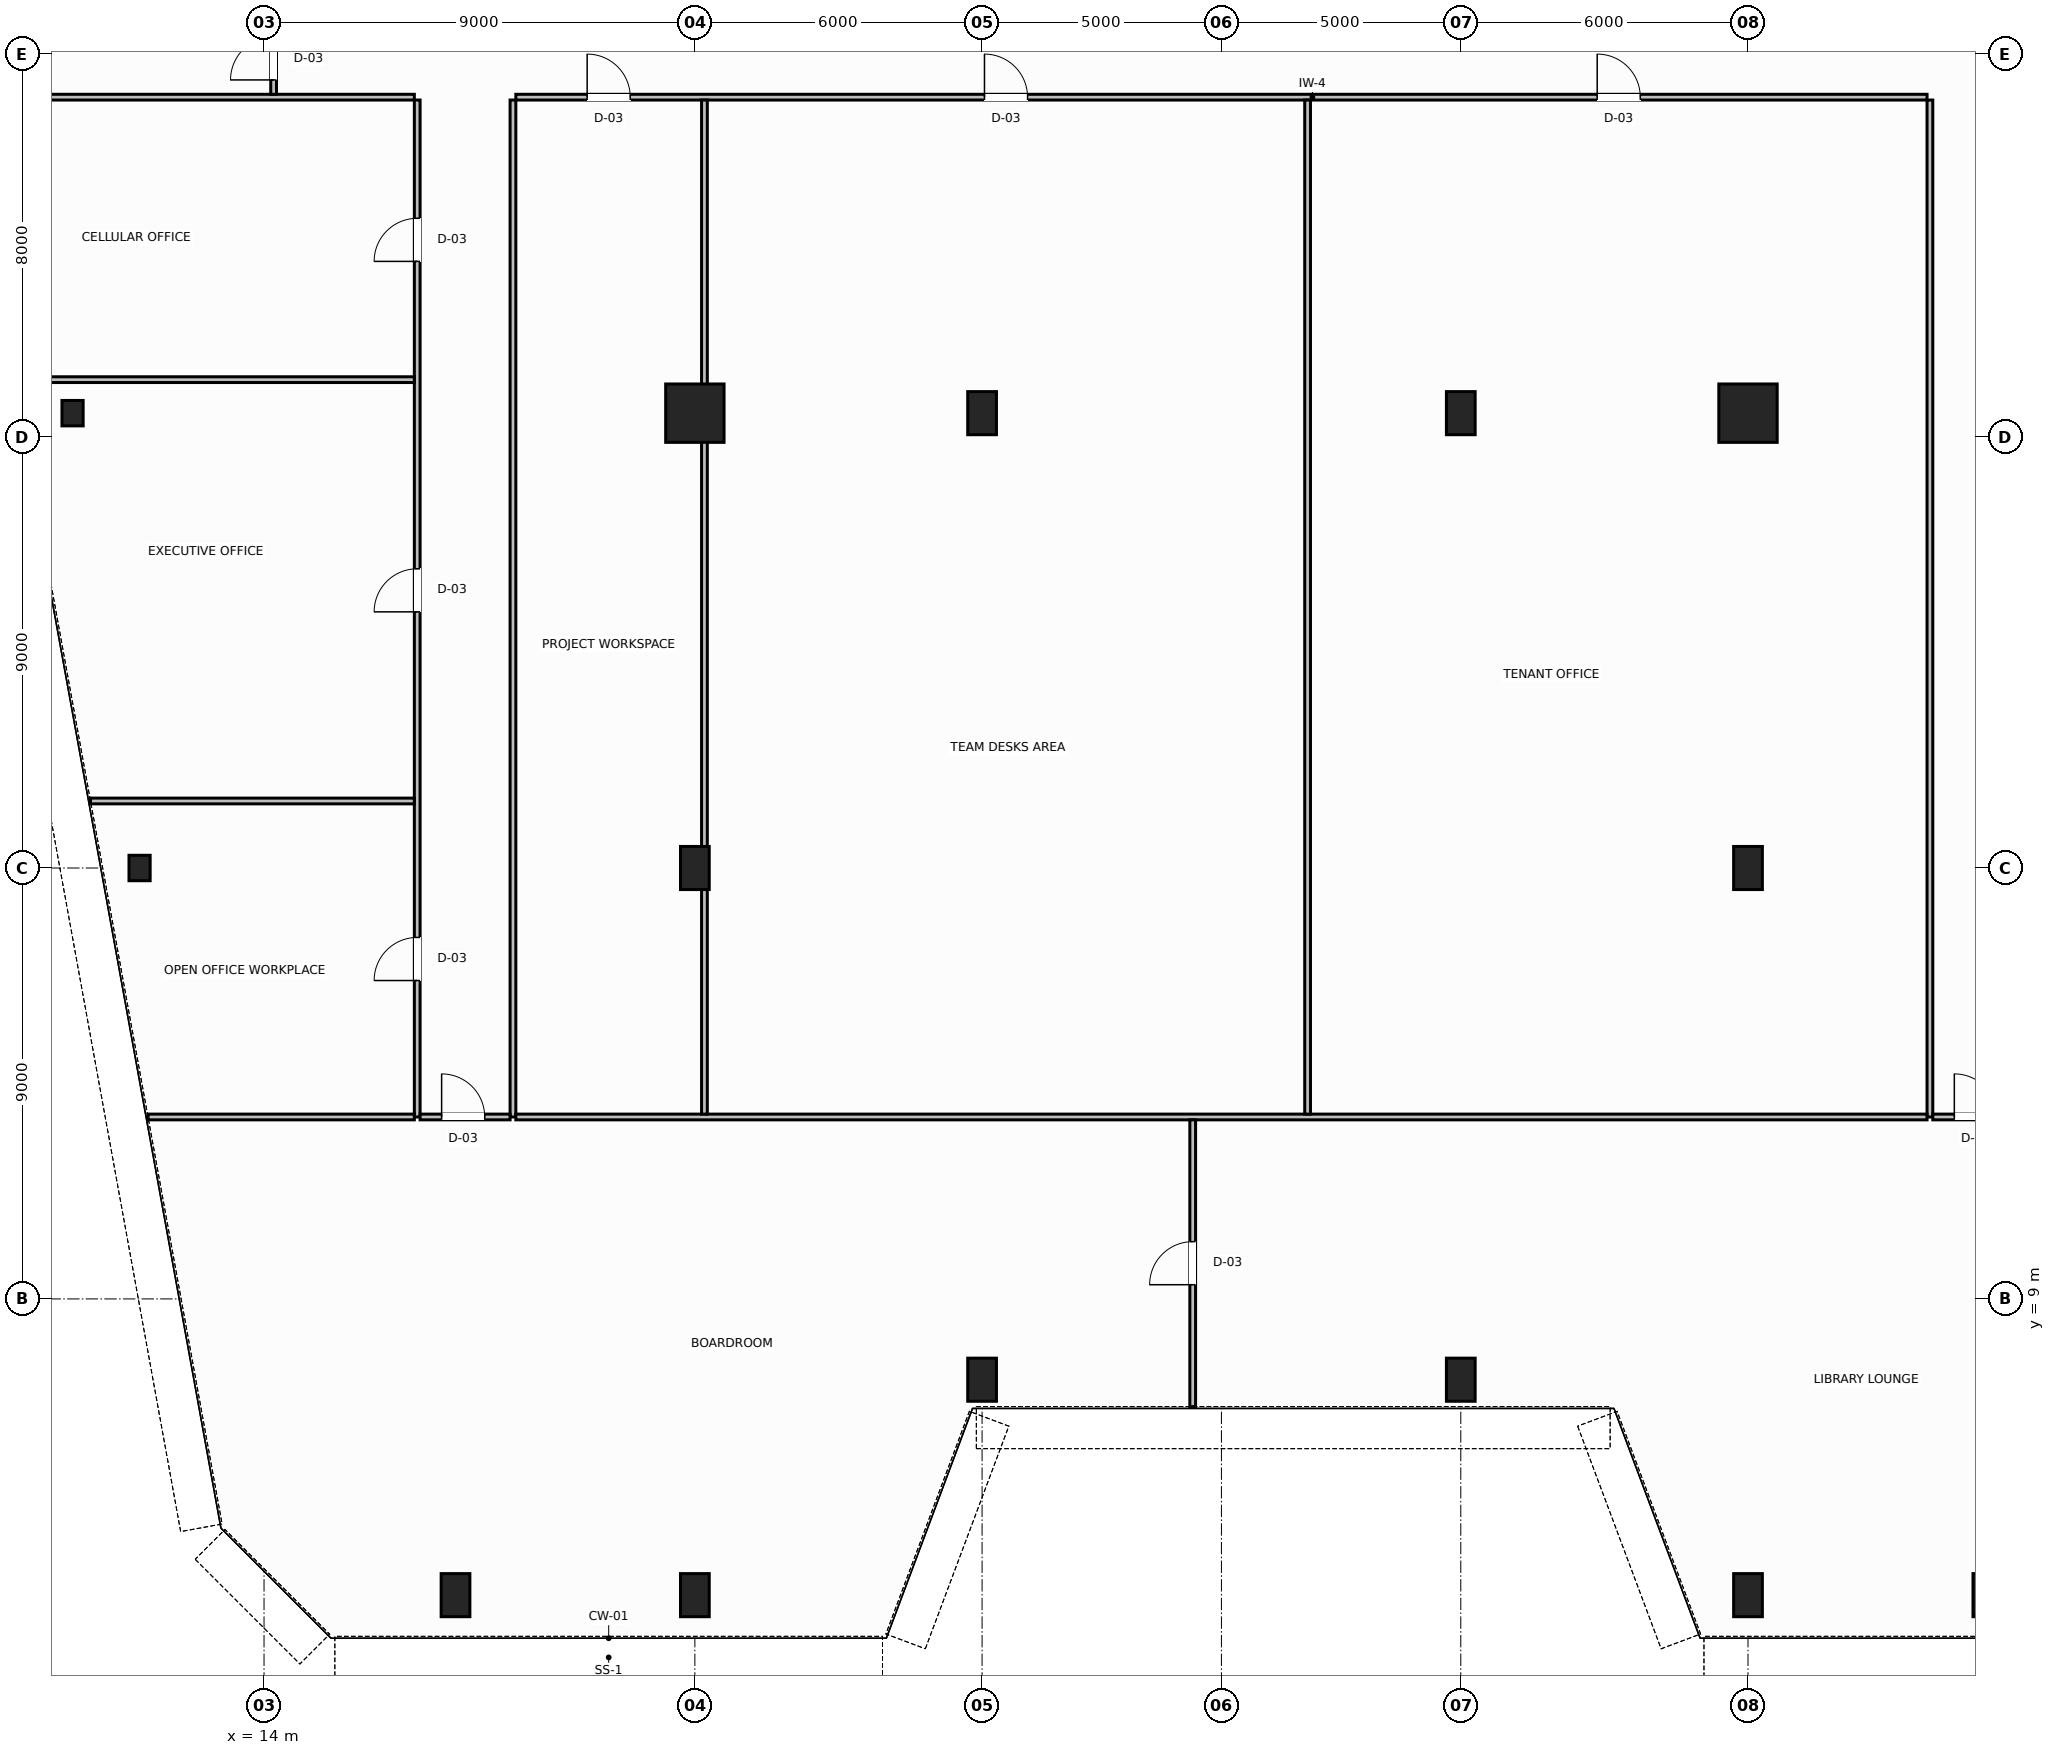
"""IFC4 building model, lengths in metres.
Left out: names, types, materials, properties, quantities, classifications, styles, units other than length and angle.
Written with IfcOpenShell. Run it as: python <this file> out.ifc"""

import sys

from ifc_helpers import new_model, si_unit, direction, frame, frame_2d, origin, origin_2d, place, context, subcontext, project, spatial, rectangle, hollow_rectangle, hollow_circle, i_section, extrude, source, transform, mapped, element, fill, save


model = new_model("IFC4")
c1 = context("Model", 3, precision=1e-05, world=origin(), true_north=direction((0.0, 1.0)))
c2 = subcontext(c1, "Body", "Model", "MODEL_VIEW")
j1 = project(units=[si_unit("LENGTHUNIT", "METRE"), si_unit("PLANEANGLEUNIT", "RADIAN")], contexts=[c1])
p1 = place(None, origin())
s1 = spatial("IfcSite", under=j1, at=p1, CompositionType="ELEMENT")
p2 = place(p1, origin())
s2 = spatial("IfcBuilding", under=s1, at=p2, CompositionType="ELEMENT")
p3 = place(p2, frame((0.0, 0.0, 49.2)))
s3 = spatial("IfcBuildingStorey", under=s2, at=p3, CompositionType="ELEMENT", Elevation=49.2)
m1 = source(origin(), c2, "Body", "SweptSolid", [
    extrude(i_section(OverallWidth=0.442, OverallDepth=0.531, WebThickness=0.065, FlangeThickness=0.076, FilletRadius=0.015, at=origin_2d()), origin(), (0.0, 0.0, 1.0), 3.8),
])
for number, where, z_axis, x_axis in (
    (1, (10.0, 27.5, 0.0), (0.0, 0.0, 1.0), (1.0, 0.0, 0.0)),
    (2, (11.4, 18.0, 0.0), (0.0, 0.0, 1.0), (1.0, 0.0, 0.0)),
):
    element("IfcColumn", number, at=place(p3, frame(where, z_axis=z_axis, x_axis=x_axis)), inside=s3, PredefinedType="COLUMN", context=c2, shape_type="MappedRepresentation", body=[
        mapped(m1, transform((0.0, 0.0, 0.0), scale=1.0)),
    ])
m2 = source(origin(), c2, "Body", "SweptSolid", [
    extrude(hollow_circle(Radius=0.61, WallThickness=0.05, at=origin_2d()), origin(), (0.0, 0.0, 1.0), 3.8),
])
p4 = place(p3, frame((23.0, 27.5, 0.0), z_axis=(0.0, 0.0, 1.0), x_axis=(1.0, 0.0, 0.0)))
e3 = element("IfcColumn", 3, at=p4, inside=s3, PredefinedType="COLUMN", context=c2, shape_type="MappedRepresentation", body=[
    mapped(m2, transform((0.0, 0.0, 0.0), scale=1.0)),
])
m3 = source(origin(), c2, "Body", "SweptSolid", [
    extrude(hollow_rectangle(XDim=0.6, YDim=0.9, WallThickness=0.04, InnerFilletRadius=0.04, OuterFilletRadius=0.08, at=origin_2d()), origin(), (0.0, 0.0, 1.0), 3.8),
])
for number, where, z_axis, x_axis in (
    (4, (29.0, 27.5, 0.0), (0.0, 0.0, 1.0), (1.0, 0.0, 0.0)),
    (5, (39.0, 27.5, 0.0), (0.0, 0.0, 1.0), (1.0, 0.0, 0.0)),
):
    element("IfcColumn", number, at=place(p3, frame(where, z_axis=z_axis, x_axis=x_axis)), inside=s3, PredefinedType="COLUMN", context=c2, shape_type="MappedRepresentation", body=[
        mapped(m3, transform((0.0, 0.0, 0.0), scale=1.0)),
    ])
p5 = place(p3, frame((45.0, 27.5, 0.0), z_axis=(0.0, 0.0, 1.0), x_axis=(1.0, 0.0, 0.0)))
e6 = element("IfcColumn", 6, at=p5, inside=s3, PredefinedType="COLUMN", context=c2, shape_type="MappedRepresentation", body=[
    mapped(m2, transform((0.0, 0.0, 0.0), scale=1.0)),
])
for number, where, z_axis, x_axis in (
    (7, (23.0, 18.0, 0.0), (0.0, 0.0, 1.0), (1.0, 0.0, 0.0)),
    (8, (45.0, 18.0, 0.0), (0.0, 0.0, 1.0), (1.0, 0.0, 0.0)),
):
    element("IfcColumn", number, at=place(p3, frame(where, z_axis=z_axis, x_axis=x_axis)), inside=s3, PredefinedType="COLUMN", context=c2, shape_type="MappedRepresentation", body=[
        mapped(m3, transform((0.0, 0.0, 0.0), scale=1.0)),
    ])
m4 = source(origin(), c2, "Body", "SweptSolid", [
    extrude(hollow_rectangle(XDim=0.6, YDim=0.9, WallThickness=0.04, InnerFilletRadius=0.04, OuterFilletRadius=0.08, at=origin_2d()), origin(), (0.0, 0.0, 1.0), 3.744),
])
for number, where, z_axis, x_axis in (
    (9, (18.0, 2.812, 0.032), (0.0, 0.064, 0.998), (-1.0, 0.0, 0.0)),
    (10, (23.0, 2.812, 0.032), (0.0, 0.064, 0.998), (-1.0, 0.0, 0.0)),
    (11, (29.0, 7.312, 0.032), (0.0, 0.064, 0.998), (-1.0, 0.0, 0.0)),
    (12, (39.0, 7.312, 0.032), (0.0, 0.064, 0.998), (-1.0, 0.0, 0.0)),
    (13, (45.0, 2.812, 0.032), (0.0, 0.064, 0.998), (-1.0, 0.0, 0.0)),
    (14, (50.0, 2.812, 0.032), (0.0, 0.064, 0.998), (-1.0, 0.0, 0.0)),
):
    element("IfcColumn", number, at=place(p3, frame(where, z_axis=z_axis, x_axis=x_axis)), inside=s3, PredefinedType="COLUMN", context=c2, shape_type="MappedRepresentation", body=[
        mapped(m4, transform((0.0, 0.0, 0.0), scale=1.0)),
    ])
p6 = place(p3, frame((19.26, 34.1, 0.0), z_axis=(0.0, 0.0, 1.0), x_axis=(1.0, 0.0, 0.0)))
e15 = element("IfcWall", 15, at=p6, inside=s3, PredefinedType="PARTITIONING", context=c2, shape_type="SweptSolid", body=[
    extrude(rectangle(XDim=29.48, YDim=0.12, at=frame_2d((14.74, 0.0))), origin(), (0.0, 0.0, 1.0), 3.58),
])
p7 = place(p6, frame((1.49, 0.0, 0.0)))
e16 = element("IfcOpeningElement", 16, at=p7, cuts=e15, PredefinedType="OPENING", context=c2, shape_type="SweptSolid", body=[
    extrude(rectangle(XDim=0.9, YDim=2.15, at=frame_2d((0.45, 1.075))), frame((0.0, 0.07, 0.0), z_axis=(0.0, -1.0, 0.0), x_axis=(1.0, 0.0, 0.0)), (0.0, 0.0, 1.0), 0.14),
])
p8 = place(p6, frame((9.79, 0.0, 0.0)))
e17 = element("IfcOpeningElement", 17, at=p8, cuts=e15, PredefinedType="OPENING", context=c2, shape_type="SweptSolid", body=[
    extrude(rectangle(XDim=0.9, YDim=2.15, at=frame_2d((0.45, 1.075))), frame((0.0, 0.07, 0.0), z_axis=(0.0, -1.0, 0.0), x_axis=(1.0, 0.0, 0.0)), (0.0, 0.0, 1.0), 0.14),
])
p9 = place(p6, frame((22.59, 0.0, 0.0)))
e18 = element("IfcOpeningElement", 18, at=p9, cuts=e15, PredefinedType="OPENING", context=c2, shape_type="SweptSolid", body=[
    extrude(rectangle(XDim=0.9, YDim=2.15, at=frame_2d((0.45, 1.075))), frame((0.0, 0.07, 0.0), z_axis=(0.0, -1.0, 0.0), x_axis=(1.0, 0.0, 0.0)), (0.0, 0.0, 1.0), 0.14),
])
p10 = place(p3, frame((7.698, 34.1, 0.0), z_axis=(0.0, 0.0, 1.0), x_axis=(1.0, 0.0, 0.0)))
e19 = element("IfcWall", 19, at=p10, inside=s3, PredefinedType="PARTITIONING", context=c2, shape_type="SweptSolid", body=[
    extrude(rectangle(XDim=9.442, YDim=0.12, at=frame_2d((4.721, 0.0))), origin(), (0.0, 0.0, 1.0), 3.58),
])
p11 = place(p3, frame((14.2, 34.16, 0.0), z_axis=(0.0, 0.0, 1.0), x_axis=(0.0, 1.0, 0.0)))
e20 = element("IfcWall", 20, at=p11, inside=s3, PredefinedType="PARTITIONING", context=c2, shape_type="SweptSolid", body=[
    extrude(rectangle(XDim=2.28, YDim=0.12, at=frame_2d((1.14, 0.0))), origin(), (0.0, 0.0, 1.0), 3.58),
])
p12 = place(p11, frame((0.3, 0.0, 0.0)))
e21 = element("IfcOpeningElement", 21, at=p12, cuts=e20, PredefinedType="OPENING", context=c2, shape_type="SweptSolid", body=[
    extrude(rectangle(XDim=0.9, YDim=2.15, at=frame_2d((0.45, 1.075))), frame((0.0, 0.07, 0.0), z_axis=(0.0, -1.0, 0.0), x_axis=(1.0, 0.0, 0.0)), (0.0, 0.0, 1.0), 0.14),
])
p13 = place(p3, frame((17.2, 12.8, 0.0), z_axis=(0.0, 0.0, 1.0), x_axis=(0.0, 1.0, 0.0)))
e22 = element("IfcWall", 22, at=p13, inside=s3, PredefinedType="PARTITIONING", context=c2, shape_type="SweptSolid", body=[
    extrude(rectangle(XDim=21.24, YDim=0.12, at=frame_2d((10.62, 0.0))), origin(), (0.0, 0.0, 1.0), 3.58),
])
p14 = place(p13, frame((2.85, 0.0, 0.0)))
e23 = element("IfcOpeningElement", 23, at=p14, cuts=e22, PredefinedType="OPENING", context=c2, shape_type="SweptSolid", body=[
    extrude(rectangle(XDim=0.9, YDim=2.15, at=frame_2d((0.45, 1.075))), frame((0.0, 0.07, 0.0), z_axis=(0.0, -1.0, 0.0), x_axis=(1.0, 0.0, 0.0)), (0.0, 0.0, 1.0), 0.14),
])
p15 = place(p13, frame((10.55, 0.0, 0.0)))
e24 = element("IfcOpeningElement", 24, at=p15, cuts=e22, PredefinedType="OPENING", context=c2, shape_type="SweptSolid", body=[
    extrude(rectangle(XDim=0.9, YDim=2.15, at=frame_2d((0.45, 1.075))), frame((0.0, 0.07, 0.0), z_axis=(0.0, -1.0, 0.0), x_axis=(1.0, 0.0, 0.0)), (0.0, 0.0, 1.0), 0.14),
])
p16 = place(p13, frame((17.87, 0.0, 0.0)))
e25 = element("IfcOpeningElement", 25, at=p16, cuts=e22, PredefinedType="OPENING", context=c2, shape_type="SweptSolid", body=[
    extrude(rectangle(XDim=0.9, YDim=2.15, at=frame_2d((0.45, 1.075))), frame((0.0, 0.07, 0.0), z_axis=(0.0, -1.0, 0.0), x_axis=(1.0, 0.0, 0.0)), (0.0, 0.0, 1.0), 0.14),
])
for number, where, z_axis, x_axis in (
    (26, (19.2, 12.8, 0.0), (0.0, 0.0, 1.0), (0.0, 1.0, 0.0)),
    (27, (48.8, 12.8, 0.0), (0.0, 0.0, 1.0), (0.0, 1.0, 0.0)),
):
    element("IfcWall", number, at=place(p3, frame(where, z_axis=z_axis, x_axis=x_axis)), inside=s3, PredefinedType="PARTITIONING", context=c2, shape_type="SweptSolid", body=[
        extrude(rectangle(XDim=21.24, YDim=0.12, at=frame_2d((10.62, 0.0))), origin(), (0.0, 0.0, 1.0), 3.58),
    ])
p17 = place(p3, frame((17.26, 12.8, 0.0), z_axis=(0.0, 0.0, 1.0), x_axis=(1.0, 0.0, 0.0)))
e28 = element("IfcWall", 28, at=p17, inside=s3, PredefinedType="PARTITIONING", context=c2, shape_type="SweptSolid", body=[
    extrude(rectangle(XDim=1.88, YDim=0.12, at=frame_2d((0.94, 0.0))), origin(), (0.0, 0.0, 1.0), 3.58),
])
p18 = place(p17, frame((0.45, 0.0, 0.0)))
e29 = element("IfcOpeningElement", 29, at=p18, cuts=e28, PredefinedType="OPENING", context=c2, shape_type="SweptSolid", body=[
    extrude(rectangle(XDim=0.9, YDim=2.15, at=frame_2d((0.45, 1.075))), frame((0.0, 0.07, 0.0), z_axis=(0.0, -1.0, 0.0), x_axis=(1.0, 0.0, 0.0)), (0.0, 0.0, 1.0), 0.14),
])
p19 = place(p3, frame((48.86, 12.8, 0.0), z_axis=(0.0, 0.0, 1.0), x_axis=(1.0, 0.0, 0.0)))
e30 = element("IfcWall", 30, at=p19, inside=s3, PredefinedType="PARTITIONING", context=c2, shape_type="SweptSolid", body=[
    extrude(rectangle(XDim=1.88, YDim=0.12, at=frame_2d((0.94, 0.0))), origin(), (0.0, 0.0, 1.0), 3.58),
])
p20 = place(p19, frame((0.45, 0.0, 0.0)))
e31 = element("IfcOpeningElement", 31, at=p20, cuts=e30, PredefinedType="OPENING", context=c2, shape_type="SweptSolid", body=[
    extrude(rectangle(XDim=0.9, YDim=2.15, at=frame_2d((0.45, 1.075))), frame((0.0, 0.07, 0.0), z_axis=(0.0, -1.0, 0.0), x_axis=(1.0, 0.0, 0.0)), (0.0, 0.0, 1.0), 0.14),
])
p21 = place(p3, frame((11.576, 12.8, 0.0), z_axis=(0.0, 0.0, 1.0), x_axis=(1.0, 0.0, 0.0)))
e32 = element("IfcWall", 32, at=p21, inside=s3, PredefinedType="PARTITIONING", context=c2, shape_type="SweptSolid", body=[
    extrude(rectangle(XDim=5.564, YDim=0.12, at=frame_2d((2.782, 0.0))), origin(), (0.0, 0.0, 1.0), 3.58),
])
p22 = place(p3, frame((10.375, 19.4, 0.0), z_axis=(0.0, 0.0, 1.0), x_axis=(1.0, 0.0, 0.0)))
e33 = element("IfcWall", 33, at=p22, inside=s3, PredefinedType="PARTITIONING", context=c2, shape_type="SweptSolid", body=[
    extrude(rectangle(XDim=6.765, YDim=0.12, at=frame_2d((3.383, 0.0))), origin(), (0.0, 0.0, 1.0), 3.58),
])
p23 = place(p3, frame((8.772, 28.2, 0.0), z_axis=(0.0, 0.0, 1.0), x_axis=(1.0, 0.0, 0.0)))
e34 = element("IfcWall", 34, at=p23, inside=s3, PredefinedType="PARTITIONING", context=c2, shape_type="SweptSolid", body=[
    extrude(rectangle(XDim=8.368, YDim=0.12, at=frame_2d((4.184, 0.0))), origin(), (0.0, 0.0, 1.0), 3.58),
])
p24 = place(p3, frame((19.26, 12.8, 0.0), z_axis=(0.0, 0.0, 1.0), x_axis=(1.0, 0.0, 0.0)))
e35 = element("IfcWall", 35, at=p24, inside=s3, PredefinedType="PARTITIONING", context=c2, shape_type="SweptSolid", body=[
    extrude(rectangle(XDim=29.48, YDim=0.12, at=frame_2d((14.74, 0.0))), origin(), (0.0, 0.0, 1.0), 3.58),
])
p25 = place(p3, frame((23.2, 12.86, 0.0), z_axis=(0.0, 0.0, 1.0), x_axis=(0.0, 1.0, 0.0)))
e36 = element("IfcWall", 36, at=p25, inside=s3, PredefinedType="PARTITIONING", context=c2, shape_type="SweptSolid", body=[
    extrude(rectangle(XDim=21.18, YDim=0.12, at=frame_2d((10.59, 0.0))), origin(), (0.0, 0.0, 1.0), 2.77),
])
p26 = place(p3, frame((35.8, 12.86, 0.0), z_axis=(0.0, 0.0, 1.0), x_axis=(0.0, 1.0, 0.0)))
e37 = element("IfcWall", 37, at=p26, inside=s3, PredefinedType="PARTITIONING", context=c2, shape_type="SweptSolid", body=[
    extrude(rectangle(XDim=21.18, YDim=0.12, at=frame_2d((10.59, 0.0))), origin(), (0.0, 0.0, 1.0), 3.58),
])
p27 = place(p3, frame((33.4, 6.753, 0.0), z_axis=(0.0, 0.0, 1.0), x_axis=(0.0, 1.0, 0.0)))
e38 = element("IfcWall", 38, at=p27, inside=s3, PredefinedType="PARTITIONING", context=c2, shape_type="SweptSolid", body=[
    extrude(rectangle(XDim=5.987, YDim=0.12, at=frame_2d((2.994, 0.0))), origin(), (0.0, 0.0, 1.0), 3.58),
])
p28 = place(p27, frame((2.544, 0.0, 0.0)))
e39 = element("IfcOpeningElement", 39, at=p28, cuts=e38, PredefinedType="OPENING", context=c2, shape_type="SweptSolid", body=[
    extrude(rectangle(XDim=0.9, YDim=2.15, at=frame_2d((0.45, 1.075))), frame((0.0, 0.07, 0.0), z_axis=(0.0, -1.0, 0.0), x_axis=(1.0, 0.0, 0.0)), (0.0, 0.0, 1.0), 0.14),
])
m5 = source(origin(), c2, "Body", "SweptSolid", [
    extrude(rectangle(XDim=0.9, YDim=2.15, at=frame_2d((0.45, 1.075))), frame((0.0, 0.025, 0.0), z_axis=(0.0, -1.0, 0.0), x_axis=(1.0, 0.0, 0.0)), (0.0, 0.0, 1.0), 0.05),
])
p29 = place(p12, origin())
e40 = element("IfcDoor", 40, at=p29, inside=s3, OperationType="SINGLE_SWING_LEFT", PredefinedType="DOOR", context=c2, shape_type="MappedRepresentation", body=[
    mapped(m5, transform((0.0, 0.0, 0.0), scale=1.0)),
])
fill(e21, e40)
p30 = place(p14, origin())
e41 = element("IfcDoor", 41, at=p30, inside=s3, OperationType="SINGLE_SWING_LEFT", PredefinedType="DOOR", context=c2, shape_type="MappedRepresentation", body=[
    mapped(m5, transform((0.0, 0.0, 0.0), scale=1.0)),
])
fill(e23, e41)
p31 = place(p15, origin())
e42 = element("IfcDoor", 42, at=p31, inside=s3, OperationType="SINGLE_SWING_RIGHT", PredefinedType="DOOR", context=c2, shape_type="MappedRepresentation", body=[
    mapped(m5, transform((0.0, 0.0, 0.0), scale=1.0)),
])
fill(e24, e42)
p32 = place(p16, origin())
e43 = element("IfcDoor", 43, at=p32, inside=s3, OperationType="SINGLE_SWING_LEFT", PredefinedType="DOOR", context=c2, shape_type="MappedRepresentation", body=[
    mapped(m5, transform((0.0, 0.0, 0.0), scale=1.0)),
])
fill(e25, e43)
p33 = place(p7, origin())
e44 = element("IfcDoor", 44, at=p33, inside=s3, OperationType="SINGLE_SWING_LEFT", PredefinedType="DOOR", context=c2, shape_type="MappedRepresentation", body=[
    mapped(m5, transform((0.0, 0.0, 0.0), scale=1.0)),
])
fill(e16, e44)
p34 = place(p8, origin())
e45 = element("IfcDoor", 45, at=p34, inside=s3, OperationType="SINGLE_SWING_RIGHT", PredefinedType="DOOR", context=c2, shape_type="MappedRepresentation", body=[
    mapped(m5, transform((0.0, 0.0, 0.0), scale=1.0)),
])
fill(e17, e45)
p35 = place(p9, origin())
e46 = element("IfcDoor", 46, at=p35, inside=s3, OperationType="SINGLE_SWING_LEFT", PredefinedType="DOOR", context=c2, shape_type="MappedRepresentation", body=[
    mapped(m5, transform((0.0, 0.0, 0.0), scale=1.0)),
])
fill(e18, e46)
p36 = place(p18, origin())
e47 = element("IfcDoor", 47, at=p36, inside=s3, OperationType="SINGLE_SWING_LEFT", PredefinedType="DOOR", context=c2, shape_type="MappedRepresentation", body=[
    mapped(m5, transform((0.0, 0.0, 0.0), scale=1.0)),
])
fill(e29, e47)
p37 = place(p28, origin())
e48 = element("IfcDoor", 48, at=p37, inside=s3, OperationType="SINGLE_SWING_RIGHT", PredefinedType="DOOR", context=c2, shape_type="MappedRepresentation", body=[
    mapped(m5, transform((0.0, 0.0, 0.0), scale=1.0)),
])
fill(e39, e48)
p38 = place(p20, origin())
e49 = element("IfcDoor", 49, at=p38, inside=s3, OperationType="SINGLE_SWING_RIGHT", PredefinedType="DOOR", context=c2, shape_type="MappedRepresentation", body=[
    mapped(m5, transform((0.0, 0.0, 0.0), scale=1.0)),
])
fill(e31, e49)
save(model, sys.argv[1])
